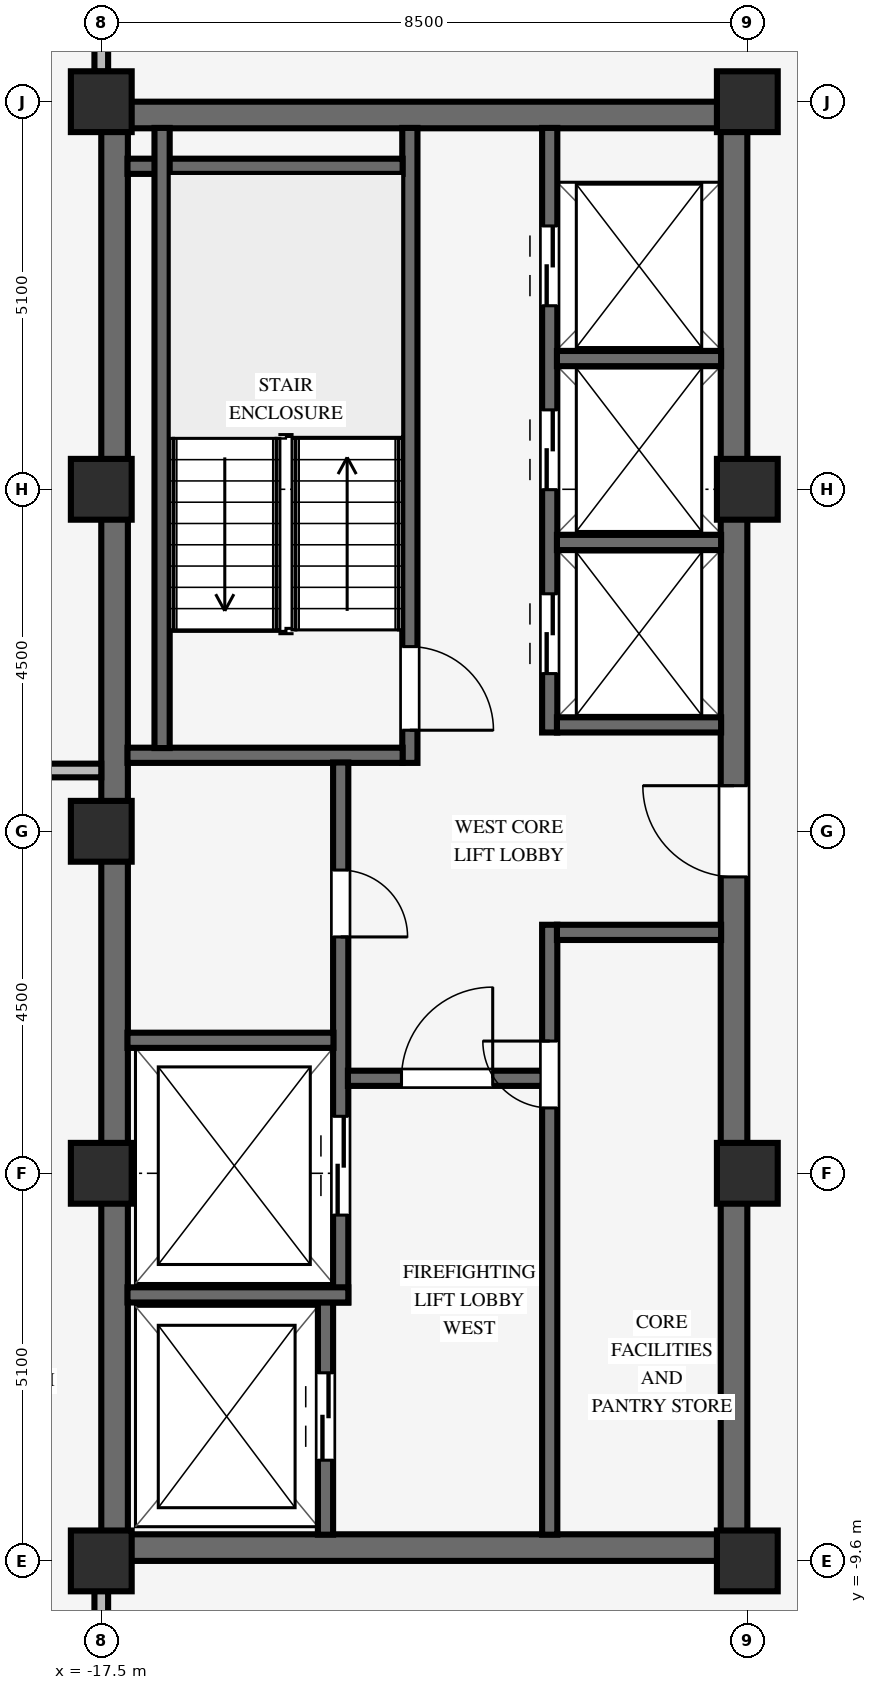
"""IFC4 building model, lengths in metres.
Left out: names, types, materials, properties, quantities, classifications, styles, units other than length and angle.
Written with IfcOpenShell. Run it as: python <this file> out.ifc"""

import sys

from ifc_helpers import new_model, si_unit, direction, frame, frame_2d, origin, origin_2d, place, context, subcontext, project, spatial, rectangle, extrude, source, transform, mapped, element, fill, save


model = new_model("IFC4")
c1 = context("Model", 3, precision=1e-05, world=origin(), true_north=direction((0.0, 1.0)))
c2 = subcontext(c1, "Body", "Model", "MODEL_VIEW")
j1 = project(units=[si_unit("LENGTHUNIT", "METRE"), si_unit("PLANEANGLEUNIT", "RADIAN")], contexts=[c1])
p1 = place(None, origin())
s1 = spatial("IfcSite", under=j1, at=p1, CompositionType="ELEMENT")
p2 = place(p1, origin())
s2 = spatial("IfcBuilding", under=s1, at=p2, CompositionType="ELEMENT")
p3 = place(p2, frame((0.0, 0.0, 276.2)))
s3 = spatial("IfcBuildingStorey", under=s2, at=p3, CompositionType="ELEMENT", Elevation=276.2)
for number, where, z_axis, x_axis in (
    (1, (-17.5, -9.425, 0.0), (0.0, 0.0, 1.0), (1.0, 0.0, 0.0)),
    (2, (-17.5, 9.425, 0.0), (0.0, 0.0, 1.0), (1.0, 0.0, 0.0)),
):
    element("IfcWall", number, at=place(p3, frame(where, z_axis=z_axis, x_axis=x_axis)), inside=s3, PredefinedType="SHEAR", context=c2, shape_type="SweptSolid", body=[
        extrude(rectangle(XDim=8.5, YDim=0.35, at=frame_2d((4.25, 0.0))), origin(), (0.0, 0.0, 1.0), 3.37),
    ])
p4 = place(p3, frame((-17.325, -9.255, 0.0), z_axis=(0.0, 0.0, 1.0), x_axis=(0.0, 1.0, 0.0)))
e3 = element("IfcWall", 3, at=p4, inside=s3, PredefinedType="SHEAR", context=c2, shape_type="SweptSolid", body=[
    extrude(rectangle(XDim=18.51, YDim=0.35, at=frame_2d((9.255, 0.0))), origin(), (0.0, 0.0, 1.0), 3.37),
])
p5 = place(p3, frame((-9.175, -9.255, 0.0), z_axis=(0.0, 0.0, 1.0), x_axis=(0.0, 1.0, 0.0)))
e4 = element("IfcWall", 4, at=p5, inside=s3, PredefinedType="SHEAR", context=c2, shape_type="SweptSolid", body=[
    extrude(rectangle(XDim=18.51, YDim=0.35, at=frame_2d((9.255, 0.0))), origin(), (0.0, 0.0, 1.0), 3.37),
])
p6 = place(p5, frame((8.655, 0.0, 0.0)))
e5 = element("IfcOpeningElement", 5, at=p6, cuts=e4, PredefinedType="OPENING", context=c2, shape_type="SweptSolid", body=[
    extrude(rectangle(XDim=1.2, YDim=2.15, at=frame_2d((0.6, 1.075))), frame((0.0, 0.185, 0.0), z_axis=(0.0, -1.0, 0.0), x_axis=(1.0, 0.0, 0.0)), (0.0, 0.0, 1.0), 0.37),
])
for number, where, z_axis, x_axis in (
    (6, (-17.5, -9.6, 0.0), (0.0, 0.0, 1.0), (1.0, 0.0, 0.0)),
    (7, (-17.5, -4.5, 0.0), (0.0, 0.0, 1.0), (1.0, 0.0, 0.0)),
    (8, (-17.5, 4.5, 0.0), (0.0, 0.0, 1.0), (1.0, 0.0, 0.0)),
    (9, (-17.5, 9.6, 0.0), (0.0, 0.0, 1.0), (1.0, 0.0, 0.0)),
    (10, (-9.0, -9.6, 0.0), (0.0, 0.0, 1.0), (1.0, 0.0, 0.0)),
    (11, (-9.0, -4.5, 0.0), (0.0, 0.0, 1.0), (1.0, 0.0, 0.0)),
    (12, (-9.0, 4.5, 0.0), (0.0, 0.0, 1.0), (1.0, 0.0, 0.0)),
    (13, (-9.0, 9.6, 0.0), (0.0, 0.0, 1.0), (1.0, 0.0, 0.0)),
    (14, (-17.5, 0.0, 0.0), (0.0, 0.0, 1.0), (1.0, 0.0, 0.0)),
):
    element("IfcColumn", number, at=place(p3, frame(where, z_axis=z_axis, x_axis=x_axis)), inside=s3, PredefinedType="COLUMN", context=c2, shape_type="SweptSolid", body=[
        extrude(rectangle(XDim=0.8, YDim=0.8, at=origin_2d()), origin(), (0.0, 0.0, 1.0), 3.37),
    ])
p7 = place(p3, frame((-13.44, 0.9, 0.0), z_axis=(0.0, 0.0, 1.0), x_axis=(0.0, 1.0, 0.0)))
e15 = element("IfcWall", 15, at=p7, inside=s3, PredefinedType="SHEAR", context=c2, shape_type="SweptSolid", body=[
    extrude(rectangle(XDim=8.355, YDim=0.2, at=frame_2d((4.177, 0.0))), origin(), (0.0, 0.0, 1.0), 3.37),
])
p8 = place(p7, frame((1.53, 0.0, 0.0), z_axis=(0.0, 0.0, 1.0), x_axis=(-1.0, 0.0, 0.0)))
e16 = element("IfcOpeningElement", 16, at=p8, cuts=e15, PredefinedType="OPENING", context=c2, shape_type="SweptSolid", body=[
    extrude(rectangle(XDim=1.1, YDim=2.15, at=frame_2d((0.55, 1.075))), frame((0.0, 0.11, 0.0), z_axis=(0.0, -1.0, 0.0), x_axis=(1.0, 0.0, 0.0)), (0.0, 0.0, 1.0), 0.22),
])
for number, where, z_axis, x_axis in (
    (17, (-17.155, 1.0, 0.0), (0.0, 0.0, 1.0), (1.0, 0.0, 0.0)),
    (18, (-17.155, 8.75, 0.0), (0.0, 0.0, 1.0), (1.0, 0.0, 0.0)),
):
    element("IfcWall", number, at=place(p3, frame(where, z_axis=z_axis, x_axis=x_axis)), inside=s3, PredefinedType="SHEAR", context=c2, shape_type="SweptSolid", body=[
        extrude(rectangle(XDim=3.62, YDim=0.2, at=frame_2d((1.81, 0.0))), origin(), (0.0, 0.0, 1.0), 3.37),
    ])
p9 = place(p3, frame((-16.7, 1.095, 0.0), z_axis=(0.0, 0.0, 1.0), x_axis=(0.0, 1.0, 0.0)))
e19 = element("IfcWall", 19, at=p9, inside=s3, PredefinedType="SHEAR", context=c2, shape_type="SweptSolid", body=[
    extrude(rectangle(XDim=8.16, YDim=0.2, at=frame_2d((4.08, 0.0))), origin(), (0.0, 0.0, 1.0), 3.37),
])
p10 = place(p3, frame((-14.55, -9.255, 0.0), z_axis=(0.0, 0.0, 1.0), x_axis=(0.0, 1.0, 0.0)))
e20 = element("IfcWall", 20, at=p10, inside=s3, PredefinedType="SHEAR", context=c2, shape_type="SweptSolid", body=[
    extrude(rectangle(XDim=3.06, YDim=0.2, at=frame_2d((1.53, 0.0))), origin(), (0.0, 0.0, 1.0), 3.37),
])
p11 = place(p10, frame((0.98, 0.0, 0.0)))
e21 = element("IfcOpeningElement", 21, at=p11, cuts=e20, PredefinedType="OPENING", context=c2, shape_type="SweptSolid", body=[
    extrude(rectangle(XDim=1.15, YDim=2.15, at=frame_2d((0.575, 1.075))), frame((0.0, 0.11, 0.0), z_axis=(0.0, -1.0, 0.0), x_axis=(1.0, 0.0, 0.0)), (0.0, 0.0, 1.0), 0.22),
])
p12 = place(p3, frame((-14.35, -6.2, 0.0), z_axis=(0.0, 0.0, 1.0), x_axis=(0.0, 1.0, 0.0)))
e22 = element("IfcWall", 22, at=p12, inside=s3, PredefinedType="SHEAR", context=c2, shape_type="SweptSolid", body=[
    extrude(rectangle(XDim=7.105, YDim=0.2, at=frame_2d((3.552, 0.0))), origin(), (0.0, 0.0, 1.0), 3.37),
])
p13 = place(p12, frame((5.69, 0.0, 0.0), z_axis=(0.0, 0.0, 1.0), x_axis=(-1.0, 0.0, 0.0)))
e23 = element("IfcOpeningElement", 23, at=p13, cuts=e22, PredefinedType="OPENING", context=c2, shape_type="SweptSolid", body=[
    extrude(rectangle(XDim=0.88, YDim=2.1, at=frame_2d((0.44, 1.05))), frame((0.0, 0.11, 0.0), z_axis=(0.0, -1.0, 0.0), x_axis=(1.0, 0.0, 0.0)), (0.0, 0.0, 1.0), 0.22),
])
p14 = place(p12, frame((1.15, 0.0, 0.0)))
e24 = element("IfcOpeningElement", 24, at=p14, cuts=e22, PredefinedType="OPENING", context=c2, shape_type="SweptSolid", body=[
    extrude(rectangle(XDim=1.3, YDim=2.2, at=frame_2d((0.65, 1.1))), frame((0.0, 0.11, 0.0), z_axis=(0.0, -1.0, 0.0), x_axis=(1.0, 0.0, 0.0)), (0.0, 0.0, 1.0), 0.22),
])
p15 = place(p3, frame((-17.155, -6.1, 0.0), z_axis=(0.0, 0.0, 1.0), x_axis=(1.0, 0.0, 0.0)))
e25 = element("IfcWall", 25, at=p15, inside=s3, PredefinedType="SHEAR", context=c2, shape_type="SweptSolid", body=[
    extrude(rectangle(XDim=2.905, YDim=0.2, at=frame_2d((1.453, 0.0))), origin(), (0.0, 0.0, 1.0), 3.37),
])
p16 = place(p3, frame((-17.155, -2.75, 0.0), z_axis=(0.0, 0.0, 1.0), x_axis=(1.0, 0.0, 0.0)))
e26 = element("IfcWall", 26, at=p16, inside=s3, PredefinedType="SHEAR", context=c2, shape_type="SweptSolid", body=[
    extrude(rectangle(XDim=2.71, YDim=0.2, at=frame_2d((1.355, 0.0))), origin(), (0.0, 0.0, 1.0), 3.37),
])
p17 = place(p3, frame((-11.6, -9.255, 0.0), z_axis=(0.0, 0.0, 1.0), x_axis=(0.0, 1.0, 0.0)))
e27 = element("IfcWall", 27, at=p17, inside=s3, PredefinedType="SHEAR", context=c2, shape_type="SweptSolid", body=[
    extrude(rectangle(XDim=8.025, YDim=0.2, at=frame_2d((4.012, 0.0))), origin(), (0.0, 0.0, 1.0), 3.37),
])
p18 = place(p17, frame((5.615, 0.0, 0.0)))
e28 = element("IfcOpeningElement", 28, at=p18, cuts=e27, PredefinedType="OPENING", context=c2, shape_type="SweptSolid", body=[
    extrude(rectangle(XDim=0.88, YDim=2.1, at=frame_2d((0.44, 1.05))), frame((0.0, 0.11, 0.0), z_axis=(0.0, -1.0, 0.0), x_axis=(1.0, 0.0, 0.0)), (0.0, 0.0, 1.0), 0.22),
])
p19 = place(p3, frame((-14.255, -3.25, 0.0), z_axis=(0.0, 0.0, 1.0), x_axis=(1.0, 0.0, 0.0)))
e29 = element("IfcWall", 29, at=p19, inside=s3, PredefinedType="SHEAR", context=c2, shape_type="SweptSolid", body=[
    extrude(rectangle(XDim=2.56, YDim=0.2, at=frame_2d((1.28, 0.0))), origin(), (0.0, 0.0, 1.0), 3.37),
])
p20 = place(p19, frame((0.705, 0.0, 0.0)))
e30 = element("IfcOpeningElement", 30, at=p20, cuts=e29, PredefinedType="OPENING", context=c2, shape_type="SweptSolid", body=[
    extrude(rectangle(XDim=1.2, YDim=2.15, at=frame_2d((0.6, 1.075))), frame((0.0, 0.11, 0.0), z_axis=(0.0, -1.0, 0.0), x_axis=(1.0, 0.0, 0.0)), (0.0, 0.0, 1.0), 0.22),
])
p21 = place(p3, frame((-11.505, -1.33, 0.0), z_axis=(0.0, 0.0, 1.0), x_axis=(1.0, 0.0, 0.0)))
e31 = element("IfcWall", 31, at=p21, inside=s3, PredefinedType="SHEAR", context=c2, shape_type="SweptSolid", body=[
    extrude(rectangle(XDim=2.16, YDim=0.2, at=frame_2d((1.08, 0.0))), origin(), (0.0, 0.0, 1.0), 3.37),
])
p22 = place(p3, frame((-11.6, 1.3, 0.0), z_axis=(0.0, 0.0, 1.0), x_axis=(0.0, 1.0, 0.0)))
e32 = element("IfcWall", 32, at=p22, inside=s3, PredefinedType="SHEAR", context=c2, shape_type="SweptSolid", body=[
    extrude(rectangle(XDim=7.955, YDim=0.2, at=frame_2d((3.978, 0.0))), origin(), (0.0, 0.0, 1.0), 3.37),
])
p23 = place(p22, frame((0.775, 0.0, 0.0)))
e33 = element("IfcOpeningElement", 33, at=p23, cuts=e32, PredefinedType="OPENING", context=c2, shape_type="SweptSolid", body=[
    extrude(rectangle(XDim=1.05, YDim=2.15, at=frame_2d((0.525, 1.075))), frame((0.0, 0.11, 0.0), z_axis=(0.0, -1.0, 0.0), x_axis=(1.0, 0.0, 0.0)), (0.0, 0.0, 1.0), 0.22),
])
p24 = place(p22, frame((3.195, 0.0, 0.0)))
e34 = element("IfcOpeningElement", 34, at=p24, cuts=e32, PredefinedType="OPENING", context=c2, shape_type="SweptSolid", body=[
    extrude(rectangle(XDim=1.05, YDim=2.15, at=frame_2d((0.525, 1.075))), frame((0.0, 0.11, 0.0), z_axis=(0.0, -1.0, 0.0), x_axis=(1.0, 0.0, 0.0)), (0.0, 0.0, 1.0), 0.22),
])
p25 = place(p22, frame((5.615, 0.0, 0.0)))
e35 = element("IfcOpeningElement", 35, at=p25, cuts=e32, PredefinedType="OPENING", context=c2, shape_type="SweptSolid", body=[
    extrude(rectangle(XDim=1.05, YDim=2.15, at=frame_2d((0.525, 1.075))), frame((0.0, 0.11, 0.0), z_axis=(0.0, -1.0, 0.0), x_axis=(1.0, 0.0, 0.0)), (0.0, 0.0, 1.0), 0.22),
])
for number, where, z_axis, x_axis in (
    (36, (-11.505, 1.4, 0.0), (0.0, 0.0, 1.0), (1.0, 0.0, 0.0)),
    (37, (-11.505, 3.8, 0.0), (0.0, 0.0, 1.0), (1.0, 0.0, 0.0)),
    (38, (-11.505, 6.22, 0.0), (0.0, 0.0, 1.0), (1.0, 0.0, 0.0)),
):
    element("IfcWall", number, at=place(p3, frame(where, z_axis=z_axis, x_axis=x_axis)), inside=s3, PredefinedType="SHEAR", context=c2, shape_type="SweptSolid", body=[
        extrude(rectangle(XDim=2.16, YDim=0.2, at=frame_2d((1.08, 0.0))), origin(), (0.0, 0.0, 1.0), 3.37),
    ])
p26 = place(p3, frame((-20.7, 0.8, 0.0), z_axis=(0.0, 0.0, 1.0), x_axis=(1.0, 0.0, 0.0)))
e39 = element("IfcWall", 39, at=p26, inside=s3, PredefinedType="PARTITIONING", context=c2, shape_type="SweptSolid", body=[
    extrude(rectangle(XDim=3.2, YDim=0.18, at=frame_2d((1.6, 0.0))), origin(), (0.0, 0.0, 1.0), 3.36),
])
for number, where, z_axis, x_axis in (
    (40, (-17.5, -11.114, 0.0), (0.0, 0.0, 1.0), (0.0, 1.0, 0.0)),
    (41, (-17.5, 9.996, 0.0), (0.0, 0.0, 1.0), (0.0, 1.0, 0.0)),
):
    element("IfcWall", number, at=place(p3, frame(where, z_axis=z_axis, x_axis=x_axis)), inside=s3, PredefinedType="PARTITIONING", context=c2, shape_type="SweptSolid", body=[
        extrude(rectangle(XDim=1.118, YDim=0.18, at=frame_2d((0.559, 0.0))), origin(), (0.0, 0.0, 1.0), 2.892),
    ])
m1 = source(origin(), c2, "Body", "SweptSolid", [
    extrude(rectangle(XDim=1.1, YDim=2.15, at=frame_2d((0.55, 1.075))), frame((0.0, 0.025, 0.0), z_axis=(0.0, -1.0, 0.0), x_axis=(1.0, 0.0, 0.0)), (0.0, 0.0, 1.0), 0.05),
])
p27 = place(p8, origin())
e42 = element("IfcDoor", 42, at=p27, inside=s3, OperationType="SINGLE_SWING_RIGHT", PredefinedType="DOOR", context=c2, shape_type="MappedRepresentation", body=[
    mapped(m1, transform((0.0, 0.0, 0.0), scale=1.0)),
])
fill(e16, e42)
m2 = source(origin(), c2, "Body", "SweptSolid", [
    extrude(rectangle(XDim=0.88, YDim=2.1, at=frame_2d((0.44, 1.05))), frame((0.0, 0.025, 0.0), z_axis=(0.0, -1.0, 0.0), x_axis=(1.0, 0.0, 0.0)), (0.0, 0.0, 1.0), 0.05),
])
p28 = place(p13, origin())
e43 = element("IfcDoor", 43, at=p28, inside=s3, OperationType="SINGLE_SWING_RIGHT", PredefinedType="DOOR", context=c2, shape_type="MappedRepresentation", body=[
    mapped(m2, transform((0.0, 0.0, 0.0), scale=1.0)),
])
fill(e23, e43)
m3 = source(origin(), c2, "Body", "SweptSolid", [
    extrude(rectangle(XDim=1.2, YDim=2.15, at=frame_2d((0.6, 1.075))), frame((0.0, 0.025, 0.0), z_axis=(0.0, -1.0, 0.0), x_axis=(1.0, 0.0, 0.0)), (0.0, 0.0, 1.0), 0.05),
])
p29 = place(p20, origin())
e44 = element("IfcDoor", 44, at=p29, inside=s3, OperationType="SINGLE_SWING_RIGHT", PredefinedType="DOOR", context=c2, shape_type="MappedRepresentation", body=[
    mapped(m3, transform((0.0, 0.0, 0.0), scale=1.0)),
])
fill(e30, e44)
p30 = place(p18, origin())
e45 = element("IfcDoor", 45, at=p30, inside=s3, OperationType="SINGLE_SWING_RIGHT", PredefinedType="DOOR", context=c2, shape_type="MappedRepresentation", body=[
    mapped(m2, transform((0.0, 0.0, 0.0), scale=1.0)),
])
fill(e28, e45)
p31 = place(p6, origin())
e46 = element("IfcDoor", 46, at=p31, inside=s3, OperationType="SINGLE_SWING_RIGHT", PredefinedType="DOOR", context=c2, shape_type="MappedRepresentation", body=[
    mapped(m3, transform((0.0, 0.0, 0.0), scale=1.0)),
])
fill(e5, e46)
m4 = source(origin(), c2, "Body", "SweptSolid", [
    extrude(rectangle(XDim=1.15, YDim=2.15, at=frame_2d((0.575, 1.075))), frame((0.0, 0.025, 0.0), z_axis=(0.0, -1.0, 0.0), x_axis=(1.0, 0.0, 0.0)), (0.0, 0.0, 1.0), 0.05),
])
p32 = place(p11, origin())
e47 = element("IfcDoor", 47, at=p32, inside=s3, OperationType="DOUBLE_DOOR_SLIDING", PredefinedType="DOOR", context=c2, shape_type="MappedRepresentation", body=[
    mapped(m4, transform((0.0, 0.0, 0.0), scale=1.0)),
])
fill(e21, e47)
m5 = source(origin(), c2, "Body", "SweptSolid", [
    extrude(rectangle(XDim=1.3, YDim=2.2, at=frame_2d((0.65, 1.1))), frame((0.0, 0.025, 0.0), z_axis=(0.0, -1.0, 0.0), x_axis=(1.0, 0.0, 0.0)), (0.0, 0.0, 1.0), 0.05),
])
p33 = place(p14, origin())
e48 = element("IfcDoor", 48, at=p33, inside=s3, OperationType="DOUBLE_DOOR_SLIDING", PredefinedType="DOOR", context=c2, shape_type="MappedRepresentation", body=[
    mapped(m5, transform((0.0, 0.0, 0.0), scale=1.0)),
])
fill(e24, e48)
m6 = source(origin(), c2, "Body", "SweptSolid", [
    extrude(rectangle(XDim=1.05, YDim=2.15, at=frame_2d((0.525, 1.075))), frame((0.0, 0.025, 0.0), z_axis=(0.0, -1.0, 0.0), x_axis=(1.0, 0.0, 0.0)), (0.0, 0.0, 1.0), 0.05),
])
p34 = place(p23, origin())
e49 = element("IfcDoor", 49, at=p34, inside=s3, OperationType="DOUBLE_DOOR_SLIDING", PredefinedType="DOOR", context=c2, shape_type="MappedRepresentation", body=[
    mapped(m6, transform((0.0, 0.0, 0.0), scale=1.0)),
])
fill(e33, e49)
p35 = place(p24, origin())
e50 = element("IfcDoor", 50, at=p35, inside=s3, OperationType="DOUBLE_DOOR_SLIDING", PredefinedType="DOOR", context=c2, shape_type="MappedRepresentation", body=[
    mapped(m6, transform((0.0, 0.0, 0.0), scale=1.0)),
])
fill(e34, e50)
p36 = place(p25, origin())
e51 = element("IfcDoor", 51, at=p36, inside=s3, OperationType="DOUBLE_DOOR_SLIDING", PredefinedType="DOOR", context=c2, shape_type="MappedRepresentation", body=[
    mapped(m6, transform((0.0, 0.0, 0.0), scale=1.0)),
])
fill(e35, e51)
save(model, sys.argv[1])
